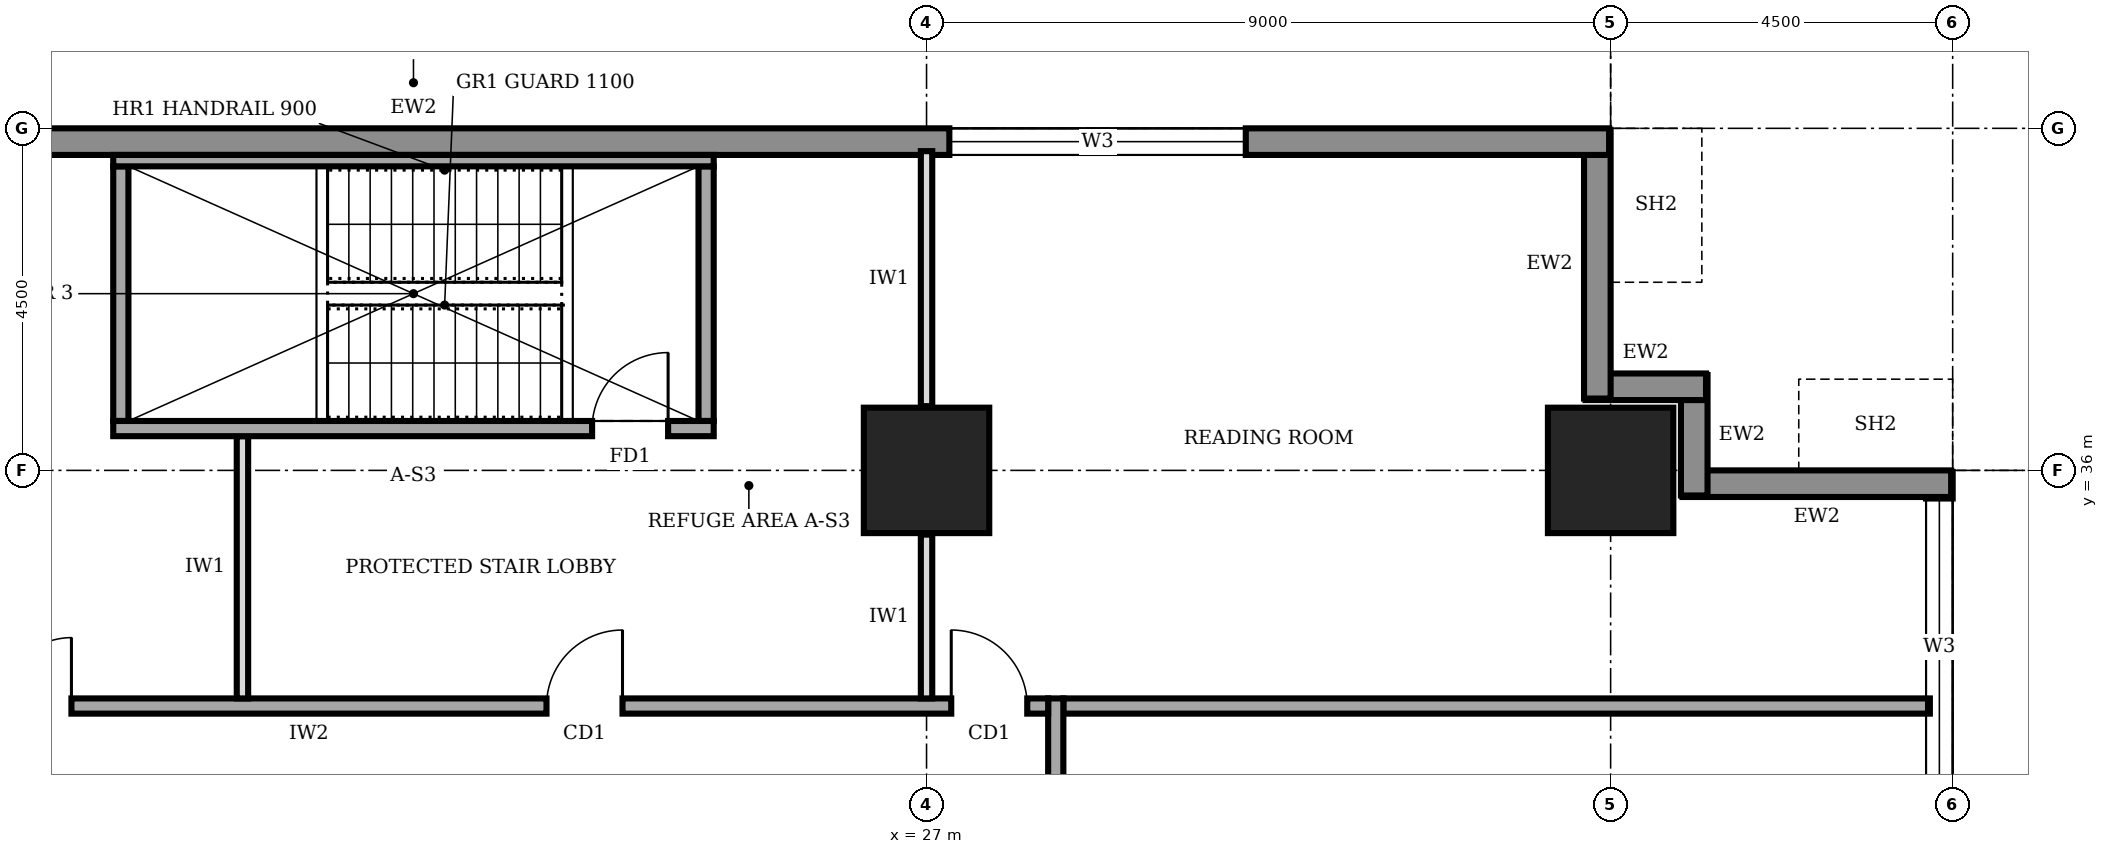
"""IFC4 building model, lengths in metres.
Left out: names, types, materials, properties, quantities, classifications, styles, units other than length and angle.
Written with IfcOpenShell. Run it as: python <this file> out.ifc"""

import sys

from ifc_helpers import new_model, si_unit, direction, frame, frame_2d, origin, origin_2d, place, context, subcontext, project, spatial, rectangle, extrude, element, fill, save


model = new_model("IFC4")
c1 = context("Model", 3, precision=1e-05, world=origin(), true_north=direction((0.0, 1.0)))
c2 = subcontext(c1, "Body", "Model", "MODEL_VIEW")
j1 = project(units=[si_unit("LENGTHUNIT", "METRE"), si_unit("PLANEANGLEUNIT", "RADIAN")], contexts=[c1])
p1 = place(None, origin())
s1 = spatial("IfcSite", under=j1, at=p1, CompositionType="ELEMENT")
p2 = place(p1, origin())
s2 = spatial("IfcBuilding", under=s1, at=p2, CompositionType="ELEMENT")
p3 = place(p2, frame((0.0, 0.0, 201.0)))
s3 = spatial("IfcBuildingStorey", under=s2, at=p3, CompositionType="ELEMENT", Elevation=201.0)
for number, where, z_axis, x_axis in (
    (1, (27.0, 36.0, 0.0), (0.0, 0.0, 1.0), (1.0, 0.0, 0.0)),
    (2, (36.0, 36.0, 0.0), (0.0, 0.0, 1.0), (1.0, 0.0, 0.0)),
):
    element("IfcColumn", number, at=place(p3, frame(where, z_axis=z_axis, x_axis=x_axis)), inside=s3, PredefinedType="COLUMN", context=c2, shape_type="SweptSolid", body=[
        extrude(rectangle(XDim=1.65, YDim=1.65, at=origin_2d()), origin(), (0.0, 0.0, 1.0), 4.0),
    ])
p4 = place(p3, frame((40.325, 4.52, 0.0), z_axis=(0.0, 0.0, 1.0), x_axis=(0.0, 1.0, 0.0)))
e3 = element("IfcWall", 3, at=p4, inside=s3, PredefinedType="STANDARD", context=c2, shape_type="SweptSolid", body=[
    extrude(rectangle(XDim=31.46, YDim=0.35, at=frame_2d((15.73, 0.0))), origin(), (0.0, 0.0, 1.0), 3.75),
])
p5 = place(p4, frame((4.78, 0.0, 0.95)))
e4 = element("IfcOpeningElement", 4, at=p5, cuts=e3, PredefinedType="OPENING", context=c2, shape_type="SweptSolid", body=[
    extrude(rectangle(XDim=3.9, YDim=1.8, at=frame_2d((1.95, 0.9))), frame((0.0, 0.185, 0.0), z_axis=(0.0, -1.0, 0.0), x_axis=(1.0, 0.0, 0.0)), (0.0, 0.0, 1.0), 0.37),
])
p6 = place(p4, frame((9.28, 0.0, 0.95)))
e5 = element("IfcOpeningElement", 5, at=p6, cuts=e3, PredefinedType="OPENING", context=c2, shape_type="SweptSolid", body=[
    extrude(rectangle(XDim=3.9, YDim=1.8, at=frame_2d((1.95, 0.9))), frame((0.0, 0.185, 0.0), z_axis=(0.0, -1.0, 0.0), x_axis=(1.0, 0.0, 0.0)), (0.0, 0.0, 1.0), 0.37),
])
p7 = place(p4, frame((13.78, 0.0, 0.95)))
e6 = element("IfcOpeningElement", 6, at=p7, cuts=e3, PredefinedType="OPENING", context=c2, shape_type="SweptSolid", body=[
    extrude(rectangle(XDim=3.9, YDim=1.8, at=frame_2d((1.95, 0.9))), frame((0.0, 0.185, 0.0), z_axis=(0.0, -1.0, 0.0), x_axis=(1.0, 0.0, 0.0)), (0.0, 0.0, 1.0), 0.37),
])
p8 = place(p4, frame((18.28, 0.0, 0.95)))
e7 = element("IfcOpeningElement", 7, at=p8, cuts=e3, PredefinedType="OPENING", context=c2, shape_type="SweptSolid", body=[
    extrude(rectangle(XDim=3.9, YDim=1.8, at=frame_2d((1.95, 0.9))), frame((0.0, 0.185, 0.0), z_axis=(0.0, -1.0, 0.0), x_axis=(1.0, 0.0, 0.0)), (0.0, 0.0, 1.0), 0.37),
])
p9 = place(p4, frame((22.78, 0.0, 0.95)))
e8 = element("IfcOpeningElement", 8, at=p9, cuts=e3, PredefinedType="OPENING", context=c2, shape_type="SweptSolid", body=[
    extrude(rectangle(XDim=3.9, YDim=1.8, at=frame_2d((1.95, 0.9))), frame((0.0, 0.185, 0.0), z_axis=(0.0, -1.0, 0.0), x_axis=(1.0, 0.0, 0.0)), (0.0, 0.0, 1.0), 0.37),
])
p10 = place(p4, frame((27.21, 0.0, 0.95)))
e9 = element("IfcOpeningElement", 9, at=p10, cuts=e3, PredefinedType="OPENING", context=c2, shape_type="SweptSolid", body=[
    extrude(rectangle(XDim=3.9, YDim=1.8, at=frame_2d((1.95, 0.9))), frame((0.0, 0.185, 0.0), z_axis=(0.0, -1.0, 0.0), x_axis=(1.0, 0.0, 0.0)), (0.0, 0.0, 1.0), 0.37),
])
p11 = place(p3, frame((40.48, 35.825, 0.0), z_axis=(0.0, 0.0, 1.0), x_axis=(-1.0, 0.0, 0.0)))
e10 = element("IfcWall", 10, at=p11, inside=s3, PredefinedType="STANDARD", context=c2, shape_type="SweptSolid", body=[
    extrude(rectangle(XDim=3.535, YDim=0.35, at=frame_2d((1.768, 0.0))), origin(), (0.0, 0.0, 1.0), 2.85),
])
for number, where, z_axis, x_axis in (
    (11, (37.1, 35.67, 0.0), (0.0, 0.0, 1.0), (0.0, 1.0, 0.0)),
    (12, (37.255, 37.1, 0.0), (0.0, 0.0, 1.0), (-1.0, 0.0, 0.0)),
):
    element("IfcWall", number, at=place(p3, frame(where, z_axis=z_axis, x_axis=x_axis)), inside=s3, PredefinedType="STANDARD", context=c2, shape_type="SweptSolid", body=[
        extrude(rectangle(XDim=1.585, YDim=0.35, at=frame_2d((0.792, 0.0))), origin(), (0.0, 0.0, 1.0), 3.75),
    ])
p12 = place(p3, frame((35.825, 36.945, 0.0), z_axis=(0.0, 0.0, 1.0), x_axis=(0.0, 1.0, 0.0)))
e13 = element("IfcWall", 13, at=p12, inside=s3, PredefinedType="STANDARD", context=c2, shape_type="SweptSolid", body=[
    extrude(rectangle(XDim=3.535, YDim=0.35, at=frame_2d((1.768, 0.0))), origin(), (0.0, 0.0, 1.0), 2.85),
])
p13 = place(p3, frame((35.98, 40.325, 0.0), z_axis=(0.0, 0.0, 1.0), x_axis=(-1.0, 0.0, 0.0)))
e14 = element("IfcWall", 14, at=p13, inside=s3, PredefinedType="STANDARD", context=c2, shape_type="SweptSolid", body=[
    extrude(rectangle(XDim=31.46, YDim=0.35, at=frame_2d((15.73, 0.0))), origin(), (0.0, 0.0, 1.0), 3.75),
])
p14 = place(p13, frame((27.21, 0.0, 0.95)))
e15 = element("IfcOpeningElement", 15, at=p14, cuts=e14, PredefinedType="OPENING", context=c2, shape_type="SweptSolid", body=[
    extrude(rectangle(XDim=3.9, YDim=1.8, at=frame_2d((1.95, 0.9))), frame((0.0, 0.185, 0.0), z_axis=(0.0, -1.0, 0.0), x_axis=(1.0, 0.0, 0.0)), (0.0, 0.0, 1.0), 0.37),
])
p15 = place(p13, frame((22.78, 0.0, 0.95)))
e16 = element("IfcOpeningElement", 16, at=p15, cuts=e14, PredefinedType="OPENING", context=c2, shape_type="SweptSolid", body=[
    extrude(rectangle(XDim=3.9, YDim=1.8, at=frame_2d((1.95, 0.9))), frame((0.0, 0.185, 0.0), z_axis=(0.0, -1.0, 0.0), x_axis=(1.0, 0.0, 0.0)), (0.0, 0.0, 1.0), 0.37),
])
p16 = place(p13, frame((4.78, 0.0, 0.95)))
e17 = element("IfcOpeningElement", 17, at=p16, cuts=e14, PredefinedType="OPENING", context=c2, shape_type="SweptSolid", body=[
    extrude(rectangle(XDim=3.9, YDim=1.8, at=frame_2d((1.95, 0.9))), frame((0.0, 0.185, 0.0), z_axis=(0.0, -1.0, 0.0), x_axis=(1.0, 0.0, 0.0)), (0.0, 0.0, 1.0), 0.37),
])
p17 = place(p3, frame((28.7, 9.2, 0.0), z_axis=(0.0, 0.0, 1.0), x_axis=(0.0, 1.0, 0.0)))
e18 = element("IfcWall", 18, at=p17, inside=s3, PredefinedType="SOLIDWALL", context=c2, shape_type="SweptSolid", body=[
    extrude(rectangle(XDim=23.8, YDim=0.2, at=frame_2d((11.9, 0.0))), origin(), (0.0, 0.0, 1.0), 3.75),
])
p18 = place(p17, frame((3.4, 0.0, 0.0)))
e19 = element("IfcOpeningElement", 19, at=p18, cuts=e18, PredefinedType="OPENING", context=c2, shape_type="SweptSolid", body=[
    extrude(rectangle(XDim=1.8, YDim=2.1, at=frame_2d((0.9, 1.05))), frame((0.0, 0.11, 0.0), z_axis=(0.0, -1.0, 0.0), x_axis=(1.0, 0.0, 0.0)), (0.0, 0.0, 1.0), 0.22),
])
p19 = place(p17, frame((10.55, 0.0, 0.0)))
e20 = element("IfcOpeningElement", 20, at=p19, cuts=e18, PredefinedType="OPENING", context=c2, shape_type="SweptSolid", body=[
    extrude(rectangle(XDim=1.0, YDim=2.1, at=frame_2d((0.5, 1.05))), frame((0.0, 0.11, 0.0), z_axis=(0.0, -1.0, 0.0), x_axis=(1.0, 0.0, 0.0)), (0.0, 0.0, 1.0), 0.22),
])
p20 = place(p17, frame((17.65, 0.0, 0.0)))
e21 = element("IfcOpeningElement", 21, at=p20, cuts=e18, PredefinedType="OPENING", context=c2, shape_type="SweptSolid", body=[
    extrude(rectangle(XDim=1.8, YDim=2.1, at=frame_2d((0.9, 1.05))), frame((0.0, 0.11, 0.0), z_axis=(0.0, -1.0, 0.0), x_axis=(1.0, 0.0, 0.0)), (0.0, 0.0, 1.0), 0.22),
])
p21 = place(p3, frame((28.6, 32.9, 0.0), z_axis=(0.0, 0.0, 1.0), x_axis=(-1.0, 0.0, 0.0)))
e22 = element("IfcWall", 22, at=p21, inside=s3, PredefinedType="SOLIDWALL", context=c2, shape_type="SweptSolid", body=[
    extrude(rectangle(XDim=16.9, YDim=0.2, at=frame_2d((8.45, 0.0))), origin(), (0.0, 0.0, 1.0), 3.75),
])
p22 = place(p21, frame((12.85, 0.0, 0.0)))
e23 = element("IfcOpeningElement", 23, at=p22, cuts=e22, PredefinedType="OPENING", context=c2, shape_type="SweptSolid", body=[
    extrude(rectangle(XDim=1.8, YDim=2.1, at=frame_2d((0.9, 1.05))), frame((0.0, 0.11, 0.0), z_axis=(0.0, -1.0, 0.0), x_axis=(1.0, 0.0, 0.0)), (0.0, 0.0, 1.0), 0.22),
])
p23 = place(p21, frame((5.6, 0.0, 0.0)))
e24 = element("IfcOpeningElement", 24, at=p23, cuts=e22, PredefinedType="OPENING", context=c2, shape_type="SweptSolid", body=[
    extrude(rectangle(XDim=1.0, YDim=2.1, at=frame_2d((0.5, 1.05))), frame((0.0, 0.11, 0.0), z_axis=(0.0, -1.0, 0.0), x_axis=(1.0, 0.0, 0.0)), (0.0, 0.0, 1.0), 0.22),
])
p24 = place(p21, frame((0.275, 0.0, 0.0)))
e25 = element("IfcOpeningElement", 25, at=p24, cuts=e22, PredefinedType="OPENING", context=c2, shape_type="SweptSolid", body=[
    extrude(rectangle(XDim=1.0, YDim=2.1, at=frame_2d((0.5, 1.05))), frame((0.0, 0.11, 0.0), z_axis=(0.0, -1.0, 0.0), x_axis=(1.0, 0.0, 0.0)), (0.0, 0.0, 1.0), 0.22),
])
p25 = place(p3, frame((28.8, 32.9, 0.0), z_axis=(0.0, 0.0, 1.0), x_axis=(1.0, 0.0, 0.0)))
e26 = element("IfcWall", 26, at=p25, inside=s3, PredefinedType="SOLIDWALL", context=c2, shape_type="SweptSolid", body=[
    extrude(rectangle(XDim=11.4, YDim=0.2, at=frame_2d((5.7, 0.0))), origin(), (0.0, 0.0, 1.0), 3.75),
])
p26 = place(p3, frame((18.0, 33.0, 0.0), z_axis=(0.0, 0.0, 1.0), x_axis=(0.0, 1.0, 0.0)))
e27 = element("IfcWall", 27, at=p26, inside=s3, PredefinedType="PARTITIONING", context=c2, shape_type="SweptSolid", body=[
    extrude(rectangle(XDim=3.45, YDim=0.15, at=frame_2d((1.725, 0.0))), origin(), (0.0, 0.0, 1.0), 3.75),
])
p27 = place(p3, frame((27.0, 33.0, 0.0), z_axis=(0.0, 0.0, 1.0), x_axis=(0.0, 1.0, 0.0)))
e28 = element("IfcWall", 28, at=p27, inside=s3, PredefinedType="PARTITIONING", context=c2, shape_type="SweptSolid", body=[
    extrude(rectangle(XDim=2.155, YDim=0.15, at=frame_2d((1.078, 0.0))), origin(), (0.0, 0.0, 1.0), 2.85),
])
p28 = place(p3, frame((27.0, 36.845, 0.0), z_axis=(0.0, 0.0, 1.0), x_axis=(0.0, 1.0, 0.0)))
e29 = element("IfcWall", 29, at=p28, inside=s3, PredefinedType="PARTITIONING", context=c2, shape_type="SweptSolid", body=[
    extrude(rectangle(XDim=3.355, YDim=0.15, at=frame_2d((1.677, 0.0))), origin(), (0.0, 0.0, 1.0), 2.85),
])
p29 = place(p3, frame((16.3, 36.55, 0.0), z_axis=(0.0, 0.0, 1.0), x_axis=(1.0, 0.0, 0.0)))
e30 = element("IfcWall", 30, at=p29, inside=s3, PredefinedType="SOLIDWALL", context=c2, shape_type="SweptSolid", body=[
    extrude(rectangle(XDim=7.9, YDim=0.2, at=frame_2d((3.95, 0.0))), origin(), (0.0, 0.0, 1.0), 3.75),
])
p30 = place(p29, frame((6.3, 0.0, 0.0)))
e31 = element("IfcOpeningElement", 31, at=p30, cuts=e30, PredefinedType="OPENING", context=c2, shape_type="SweptSolid", body=[
    extrude(rectangle(XDim=1.0, YDim=2.1, at=frame_2d((0.5, 1.05))), frame((0.0, 0.11, 0.0), z_axis=(0.0, -1.0, 0.0), x_axis=(1.0, 0.0, 0.0)), (0.0, 0.0, 1.0), 0.22),
])
p31 = place(p3, frame((16.3, 40.075, 0.0), z_axis=(0.0, 0.0, 1.0), x_axis=(1.0, 0.0, 0.0)))
e32 = element("IfcWall", 32, at=p31, inside=s3, PredefinedType="SOLIDWALL", context=c2, shape_type="SweptSolid", body=[
    extrude(rectangle(XDim=7.9, YDim=0.15, at=frame_2d((3.95, 0.0))), origin(), (0.0, 0.0, 1.0), 3.75),
])
for number, where, z_axis, x_axis in (
    (33, (16.4, 36.65, 0.0), (0.0, 0.0, 1.0), (0.0, 1.0, 0.0)),
    (34, (24.1, 36.65, 0.0), (0.0, 0.0, 1.0), (0.0, 1.0, 0.0)),
):
    element("IfcWall", number, at=place(p3, frame(where, z_axis=z_axis, x_axis=x_axis)), inside=s3, PredefinedType="SOLIDWALL", context=c2, shape_type="SweptSolid", body=[
        extrude(rectangle(XDim=3.35, YDim=0.2, at=frame_2d((1.675, 0.0))), origin(), (0.0, 0.0, 1.0), 3.75),
    ])
p32 = place(p10, origin())
e35 = element("IfcWindow", 35, at=p32, inside=s3, PartitioningType="SINGLE_PANEL", PredefinedType="WINDOW", context=c2, shape_type="SweptSolid", body=[
    extrude(rectangle(XDim=3.9, YDim=1.8, at=frame_2d((1.95, 0.9))), frame((0.0, 0.03, 0.0), z_axis=(0.0, -1.0, 0.0), x_axis=(1.0, 0.0, 0.0)), (0.0, 0.0, 1.0), 0.06),
])
fill(e9, e35)
p33 = place(p16, origin())
e36 = element("IfcWindow", 36, at=p33, inside=s3, PartitioningType="SINGLE_PANEL", PredefinedType="WINDOW", context=c2, shape_type="SweptSolid", body=[
    extrude(rectangle(XDim=3.9, YDim=1.8, at=frame_2d((1.95, 0.9))), frame((0.0, 0.03, 0.0), z_axis=(0.0, -1.0, 0.0), x_axis=(1.0, 0.0, 0.0)), (0.0, 0.0, 1.0), 0.06),
])
fill(e17, e36)
p34 = place(p22, frame((1.8, 0.0, 0.0), z_axis=(0.0, 0.0, 1.0), x_axis=(-1.0, 0.0, 0.0)))
e37 = element("IfcDoor", 37, at=p34, inside=s3, OperationType="DOUBLE_DOOR_SINGLE_SWING", PredefinedType="DOOR", context=c2, shape_type="SweptSolid", body=[
    extrude(rectangle(XDim=1.8, YDim=2.1, at=frame_2d((0.9, 1.05))), frame((0.0, 0.025, 0.0), z_axis=(0.0, -1.0, 0.0), x_axis=(1.0, 0.0, 0.0)), (0.0, 0.0, 1.0), 0.05),
])
fill(e23, e37)
p35 = place(p23, frame((1.0, 0.0, 0.0), z_axis=(0.0, 0.0, 1.0), x_axis=(-1.0, 0.0, 0.0)))
e38 = element("IfcDoor", 38, at=p35, inside=s3, OperationType="SINGLE_SWING_RIGHT", PredefinedType="DOOR", context=c2, shape_type="SweptSolid", body=[
    extrude(rectangle(XDim=1.0, YDim=2.1, at=frame_2d((0.5, 1.05))), frame((0.0, 0.025, 0.0), z_axis=(0.0, -1.0, 0.0), x_axis=(1.0, 0.0, 0.0)), (0.0, 0.0, 1.0), 0.05),
])
fill(e24, e38)
p36 = place(p24, frame((1.0, 0.0, 0.0), z_axis=(0.0, 0.0, 1.0), x_axis=(-1.0, 0.0, 0.0)))
e39 = element("IfcDoor", 39, at=p36, inside=s3, OperationType="SINGLE_SWING_LEFT", PredefinedType="DOOR", context=c2, shape_type="SweptSolid", body=[
    extrude(rectangle(XDim=1.0, YDim=2.1, at=frame_2d((0.5, 1.05))), frame((0.0, 0.025, 0.0), z_axis=(0.0, -1.0, 0.0), x_axis=(1.0, 0.0, 0.0)), (0.0, 0.0, 1.0), 0.05),
])
fill(e25, e39)
p37 = place(p30, origin())
e40 = element("IfcDoor", 40, at=p37, inside=s3, OperationType="SINGLE_SWING_RIGHT", PredefinedType="DOOR", context=c2, shape_type="SweptSolid", body=[
    extrude(rectangle(XDim=1.0, YDim=2.1, at=frame_2d((0.5, 1.05))), frame((0.0, 0.025, 0.0), z_axis=(0.0, -1.0, 0.0), x_axis=(1.0, 0.0, 0.0)), (0.0, 0.0, 1.0), 0.05),
])
fill(e31, e40)
save(model, sys.argv[1])
